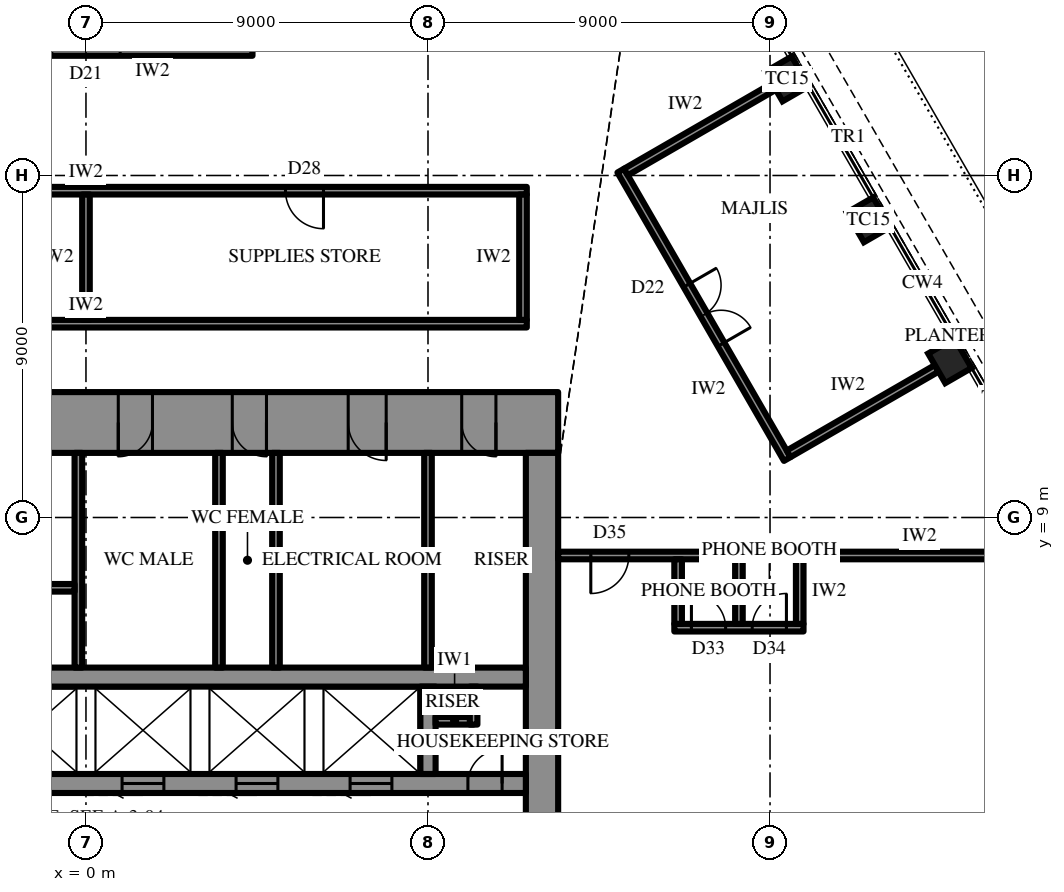
"""IFC4 building model, lengths in metres.
Left out: names, types, materials, properties, quantities, classifications, styles, units other than length and angle.
Written with IfcOpenShell. Run it as: python <this file> out.ifc"""

import sys

from ifc_helpers import new_model, si_unit, direction, frame, frame_2d, origin, origin_2d, place, context, subcontext, project, spatial, rectangle, extrude, element, fill, save


model = new_model("IFC4")
c1 = context("Model", 3, precision=1e-05, world=origin(), true_north=direction((0.0, 1.0)))
c2 = subcontext(c1, "Body", "Model", "MODEL_VIEW")
j1 = project(units=[si_unit("LENGTHUNIT", "METRE"), si_unit("PLANEANGLEUNIT", "RADIAN")], contexts=[c1])
p1 = place(None, origin())
s1 = spatial("IfcSite", under=j1, at=p1, CompositionType="ELEMENT")
p2 = place(p1, origin())
s2 = spatial("IfcBuilding", under=s1, at=p2, CompositionType="ELEMENT")
p3 = place(p2, frame((0.0, 0.0, 361.9)))
s3 = spatial("IfcBuildingStorey", under=s2, at=p3, CompositionType="ELEMENT", Elevation=361.9)
for number, where, z_axis, x_axis in (
    (1, (22.733, 13.125, 0.0), (0.0, 0.0, 1.0), (-0.5, 0.866, 0.0)),
    (2, (20.592, 16.833, 0.0), (0.0, 0.0, 1.0), (-0.5, 0.866, 0.0)),
    (3, (18.451, 20.542, 0.0), (0.0, 0.0, 1.0), (-0.5, 0.866, 0.0)),
):
    element("IfcColumn", number, at=place(p3, frame(where, z_axis=z_axis, x_axis=x_axis)), inside=s3, PredefinedType="COLUMN", context=c2, shape_type="SweptSolid", body=[
        extrude(rectangle(XDim=0.9, YDim=0.8, at=origin_2d()), origin(), (0.0, 0.0, 1.0), 4.2),
    ])
p4 = place(p3, frame((-12.425, 11.5, 0.0), z_axis=(0.0, 0.0, 1.0), x_axis=(1.0, 0.0, 0.0)))
e4 = element("IfcWall", 4, at=p4, inside=s3, PredefinedType="SHEAR", context=c2, shape_type="SweptSolid", body=[
    extrude(rectangle(XDim=24.85, YDim=1.6, at=frame_2d((12.425, 0.0))), origin(), (0.0, 0.0, 1.0), 4.2),
])
p5 = place(p4, frame((13.275, 0.0, 0.0)))
e5 = element("IfcOpeningElement", 5, at=p5, cuts=e4, PredefinedType="OPENING", context=c2, shape_type="SweptSolid", body=[
    extrude(rectangle(XDim=0.9, YDim=2.2, at=frame_2d((0.45, 1.1))), frame((0.0, 0.81, 0.0), z_axis=(0.0, -1.0, 0.0), x_axis=(1.0, 0.0, 0.0)), (0.0, 0.0, 1.0), 1.62),
])
p6 = place(p4, frame((16.275, 0.0, 0.0)))
e6 = element("IfcOpeningElement", 6, at=p6, cuts=e4, PredefinedType="OPENING", context=c2, shape_type="SweptSolid", body=[
    extrude(rectangle(XDim=0.9, YDim=2.2, at=frame_2d((0.45, 1.1))), frame((0.0, 0.81, 0.0), z_axis=(0.0, -1.0, 0.0), x_axis=(1.0, 0.0, 0.0)), (0.0, 0.0, 1.0), 1.62),
])
p7 = place(p4, frame((19.325, 0.0, 0.0)))
e7 = element("IfcOpeningElement", 7, at=p7, cuts=e4, PredefinedType="OPENING", context=c2, shape_type="SweptSolid", body=[
    extrude(rectangle(XDim=1.0, YDim=2.2, at=frame_2d((0.5, 1.1))), frame((0.0, 0.81, 0.0), z_axis=(0.0, -1.0, 0.0), x_axis=(1.0, 0.0, 0.0)), (0.0, 0.0, 1.0), 1.62),
])
p8 = place(p4, frame((1.637, 0.0, 0.0)))
e8 = element("IfcOpeningElement", 8, at=p8, cuts=e4, PredefinedType="OPENING", context=c2, shape_type="SweptSolid", body=[
    extrude(rectangle(XDim=0.9, YDim=2.2, at=frame_2d((0.45, 1.1))), frame((0.0, 0.81, 0.0), z_axis=(0.0, -1.0, 0.0), x_axis=(1.0, 0.0, 0.0)), (0.0, 0.0, 1.0), 1.62),
])
p9 = place(p4, frame((22.312, 0.0, 0.0)))
e9 = element("IfcOpeningElement", 9, at=p9, cuts=e4, PredefinedType="OPENING", context=c2, shape_type="SweptSolid", body=[
    extrude(rectangle(XDim=0.9, YDim=2.2, at=frame_2d((0.45, 1.1))), frame((0.0, 0.81, 0.0), z_axis=(0.0, -1.0, 0.0), x_axis=(1.0, 0.0, 0.0)), (0.0, 0.0, 1.0), 1.62),
])
p10 = place(p3, frame((12.0, -10.7, 0.0), z_axis=(0.0, 0.0, 1.0), x_axis=(0.0, 1.0, 0.0)))
e10 = element("IfcWall", 10, at=p10, inside=s3, PredefinedType="SHEAR", context=c2, shape_type="SweptSolid", body=[
    extrude(rectangle(XDim=21.4, YDim=0.85, at=frame_2d((10.7, 0.0))), origin(), (0.0, 0.0, 1.0), 4.2),
])
p11 = place(p10, frame((9.8, 0.0, 0.0)))
e11 = element("IfcOpeningElement", 11, at=p11, cuts=e10, PredefinedType="OPENING", context=c2, shape_type="SweptSolid", body=[
    extrude(rectangle(XDim=1.8, YDim=2.4, at=frame_2d((0.9, 1.2))), frame((0.0, 0.435, 0.0), z_axis=(0.0, -1.0, 0.0), x_axis=(1.0, 0.0, 0.0)), (0.0, 0.0, 1.0), 0.87),
])
p12 = place(p3, frame((-3.2, 2.0, 0.0), z_axis=(0.0, 0.0, 1.0), x_axis=(1.0, 0.0, 0.0)))
e12 = element("IfcWall", 12, at=p12, inside=s3, PredefinedType="SHEAR", context=c2, shape_type="SweptSolid", body=[
    extrude(rectangle(XDim=14.775, YDim=0.5, at=frame_2d((7.387, 0.0))), origin(), (0.0, 0.0, 1.0), 4.2),
])
p13 = place(p12, frame((13.25, 0.0, 0.0)))
e13 = element("IfcOpeningElement", 13, at=p13, cuts=e12, PredefinedType="OPENING", context=c2, shape_type="SweptSolid", body=[
    extrude(rectangle(XDim=0.9, YDim=2.2, at=frame_2d((0.45, 1.1))), frame((0.0, 0.26, 0.0), z_axis=(0.0, -1.0, 0.0), x_axis=(1.0, 0.0, 0.0)), (0.0, 0.0, 1.0), 0.52),
])
p14 = place(p12, frame((1.15, 0.0, 0.0)))
e14 = element("IfcOpeningElement", 14, at=p14, cuts=e12, PredefinedType="OPENING", context=c2, shape_type="SweptSolid", body=[
    extrude(rectangle(XDim=1.1, YDim=2.2, at=frame_2d((0.55, 1.1))), frame((0.0, 0.26, 0.0), z_axis=(0.0, -1.0, 0.0), x_axis=(1.0, 0.0, 0.0)), (0.0, 0.0, 1.0), 0.52),
])
p15 = place(p12, frame((4.15, 0.0, 0.0)))
e15 = element("IfcOpeningElement", 15, at=p15, cuts=e12, PredefinedType="OPENING", context=c2, shape_type="SweptSolid", body=[
    extrude(rectangle(XDim=1.1, YDim=2.2, at=frame_2d((0.55, 1.1))), frame((0.0, 0.26, 0.0), z_axis=(0.0, -1.0, 0.0), x_axis=(1.0, 0.0, 0.0)), (0.0, 0.0, 1.0), 0.52),
])
p16 = place(p12, frame((7.15, 0.0, 0.0)))
e16 = element("IfcOpeningElement", 16, at=p16, cuts=e12, PredefinedType="OPENING", context=c2, shape_type="SweptSolid", body=[
    extrude(rectangle(XDim=1.1, YDim=2.2, at=frame_2d((0.55, 1.1))), frame((0.0, 0.26, 0.0), z_axis=(0.0, -1.0, 0.0), x_axis=(1.0, 0.0, 0.0)), (0.0, 0.0, 1.0), 0.52),
])
p17 = place(p12, frame((10.15, 0.0, 0.0)))
e17 = element("IfcOpeningElement", 17, at=p17, cuts=e12, PredefinedType="OPENING", context=c2, shape_type="SweptSolid", body=[
    extrude(rectangle(XDim=1.1, YDim=2.2, at=frame_2d((0.55, 1.1))), frame((0.0, 0.26, 0.0), z_axis=(0.0, -1.0, 0.0), x_axis=(1.0, 0.0, 0.0)), (0.0, 0.0, 1.0), 0.52),
])
p18 = place(p3, frame((-11.575, 4.8, 0.0), z_axis=(0.0, 0.0, 1.0), x_axis=(1.0, 0.0, 0.0)))
e18 = element("IfcWall", 18, at=p18, inside=s3, PredefinedType="SHEAR", context=c2, shape_type="SweptSolid", body=[
    extrude(rectangle(XDim=23.15, YDim=0.5, at=frame_2d((11.575, 0.0))), origin(), (0.0, 0.0, 1.0), 4.2),
])
p19 = place(p18, frame((6.475, 0.0, 0.0)))
e19 = element("IfcOpeningElement", 19, at=p19, cuts=e18, PredefinedType="OPENING", context=c2, shape_type="SweptSolid", body=[
    extrude(rectangle(XDim=1.2, YDim=2.2, at=frame_2d((0.6, 1.1))), frame((0.0, 0.26, 0.0), z_axis=(0.0, -1.0, 0.0), x_axis=(1.0, 0.0, 0.0)), (0.0, 0.0, 1.0), 0.52),
])
p20 = place(p18, frame((3.475, 0.0, 0.0)))
e20 = element("IfcOpeningElement", 20, at=p20, cuts=e18, PredefinedType="OPENING", context=c2, shape_type="SweptSolid", body=[
    extrude(rectangle(XDim=1.2, YDim=2.2, at=frame_2d((0.6, 1.1))), frame((0.0, 0.26, 0.0), z_axis=(0.0, -1.0, 0.0), x_axis=(1.0, 0.0, 0.0)), (0.0, 0.0, 1.0), 0.52),
])
p21 = place(p3, frame((9.0, 2.25, 0.0), z_axis=(0.0, 0.0, 1.0), x_axis=(0.0, 1.0, 0.0)))
e21 = element("IfcWall", 21, at=p21, inside=s3, PredefinedType="SHEAR", context=c2, shape_type="SweptSolid", body=[
    extrude(rectangle(XDim=2.3, YDim=0.4, at=frame_2d((1.15, 0.0))), origin(), (0.0, 0.0, 1.0), 4.2),
])
p22 = place(p3, frame((-0.2, 5.05, 0.0), z_axis=(0.0, 0.0, 1.0), x_axis=(0.0, 1.0, 0.0)))
e22 = element("IfcWall", 22, at=p22, inside=s3, PredefinedType="SHEAR", context=c2, shape_type="SweptSolid", body=[
    extrude(rectangle(XDim=5.65, YDim=0.2, at=frame_2d((2.825, 0.0))), origin(), (0.0, 0.0, 1.0), 4.2),
])
p23 = place(p3, frame((-8.9, 7.15, 0.0), z_axis=(0.0, 0.0, 1.0), x_axis=(1.0, 0.0, 0.0)))
e23 = element("IfcWall", 23, at=p23, inside=s3, PredefinedType="SHEAR", context=c2, shape_type="SweptSolid", body=[
    extrude(rectangle(XDim=8.6, YDim=0.2, at=frame_2d((4.3, 0.0))), origin(), (0.0, 0.0, 1.0), 4.2),
])
p24 = place(p23, frame((0.3, 0.0, 0.0)))
e24 = element("IfcOpeningElement", 24, at=p24, cuts=e23, PredefinedType="OPENING", context=c2, shape_type="SweptSolid", body=[
    extrude(rectangle(XDim=1.0, YDim=2.2, at=frame_2d((0.5, 1.1))), frame((0.0, 0.11, 0.0), z_axis=(0.0, -1.0, 0.0), x_axis=(1.0, 0.0, 0.0)), (0.0, 0.0, 1.0), 0.22),
])
for number, where, z_axis, x_axis in (
    (25, (9.0, 5.05, 0.0), (0.0, 0.0, 1.0), (0.0, 1.0, 0.0)),
    (26, (3.5, 5.05, 0.0), (0.0, 0.0, 1.0), (0.0, 1.0, 0.0)),
    (27, (5.0, 5.05, 0.0), (0.0, 0.0, 1.0), (0.0, 1.0, 0.0)),
):
    element("IfcWall", number, at=place(p3, frame(where, z_axis=z_axis, x_axis=x_axis)), inside=s3, PredefinedType="PARTITIONING", context=c2, shape_type="SweptSolid", body=[
        extrude(rectangle(XDim=5.65, YDim=0.2, at=frame_2d((2.825, 0.0))), origin(), (0.0, 0.0, 1.0), 4.0),
    ])
for number, where, z_axis, x_axis in (
    (28, (9.2, 3.65, 0.0), (0.0, 0.0, 1.0), (1.0, 0.0, 0.0)),
    (29, (10.2, 3.55, 0.0), (0.0, 0.0, 1.0), (0.0, 1.0, 0.0)),
):
    element("IfcWall", number, at=place(p3, frame(where, z_axis=z_axis, x_axis=x_axis)), inside=s3, PredefinedType="PARTITIONING", context=c2, shape_type="SweptSolid", body=[
        extrude(rectangle(XDim=1.0, YDim=0.2, at=frame_2d((0.5, 0.0))), origin(), (0.0, 0.0, 1.0), 4.0),
    ])
p25 = place(p3, frame((-11.6, 14.1, 0.0), z_axis=(0.0, 0.0, 1.0), x_axis=(1.0, 0.0, 0.0)))
e30 = element("IfcWall", 30, at=p25, inside=s3, PredefinedType="PARTITIONING", context=c2, shape_type="SweptSolid", body=[
    extrude(rectangle(XDim=23.2, YDim=0.2, at=frame_2d((11.6, 0.0))), origin(), (0.0, 0.0, 1.0), 4.0),
])
p26 = place(p3, frame((-11.6, 17.6, 0.0), z_axis=(0.0, 0.0, 1.0), x_axis=(1.0, 0.0, 0.0)))
e31 = element("IfcWall", 31, at=p26, inside=s3, PredefinedType="PARTITIONING", context=c2, shape_type="SweptSolid", body=[
    extrude(rectangle(XDim=23.2, YDim=0.2, at=frame_2d((11.6, 0.0))), origin(), (0.0, 0.0, 1.0), 4.0),
])
p27 = place(p26, frame((5.35, 0.0, 0.0)))
e32 = element("IfcOpeningElement", 32, at=p27, cuts=e31, PredefinedType="OPENING", context=c2, shape_type="SweptSolid", body=[
    extrude(rectangle(XDim=1.0, YDim=2.2, at=frame_2d((0.5, 1.1))), frame((0.0, 0.11, 0.0), z_axis=(0.0, -1.0, 0.0), x_axis=(1.0, 0.0, 0.0)), (0.0, 0.0, 1.0), 0.22),
])
p28 = place(p26, frame((16.85, 0.0, 0.0)))
e33 = element("IfcOpeningElement", 33, at=p28, cuts=e31, PredefinedType="OPENING", context=c2, shape_type="SweptSolid", body=[
    extrude(rectangle(XDim=1.0, YDim=2.2, at=frame_2d((0.5, 1.1))), frame((0.0, 0.11, 0.0), z_axis=(0.0, -1.0, 0.0), x_axis=(1.0, 0.0, 0.0)), (0.0, 0.0, 1.0), 0.22),
])
p29 = place(p3, frame((0.0, 14.2, 0.0), z_axis=(0.0, 0.0, 1.0), x_axis=(0.0, 1.0, 0.0)))
e34 = element("IfcWall", 34, at=p29, inside=s3, PredefinedType="PARTITIONING", context=c2, shape_type="SweptSolid", body=[
    extrude(rectangle(XDim=3.3, YDim=0.2, at=frame_2d((1.65, 0.0))), origin(), (0.0, 0.0, 1.0), 2.992),
])
p30 = place(p3, frame((11.5, 14.2, 0.0), z_axis=(0.0, 0.0, 1.0), x_axis=(0.0, 1.0, 0.0)))
e35 = element("IfcWall", 35, at=p30, inside=s3, PredefinedType="PARTITIONING", context=c2, shape_type="SweptSolid", body=[
    extrude(rectangle(XDim=3.3, YDim=0.2, at=frame_2d((1.65, 0.0))), origin(), (0.0, 0.0, 1.0), 4.0),
])
p31 = place(p3, frame((4.382, 21.25, 0.0), z_axis=(0.0, 0.0, 1.0), x_axis=(-1.0, 0.0, 0.0)))
e36 = element("IfcWall", 36, at=p31, inside=s3, PredefinedType="PARTITIONING", context=c2, shape_type="SweptSolid", body=[
    extrude(rectangle(XDim=8.764, YDim=0.2, at=frame_2d((4.382, 0.0))), origin(), (0.0, 0.0, 1.0), 4.0),
])
p32 = place(p31, frame((3.482, 0.0, 0.0)))
e37 = element("IfcOpeningElement", 37, at=p32, cuts=e36, PredefinedType="OPENING", context=c2, shape_type="SweptSolid", body=[
    extrude(rectangle(XDim=1.8, YDim=2.4, at=frame_2d((0.9, 1.2))), frame((0.0, 0.11, 0.0), z_axis=(0.0, -1.0, 0.0), x_axis=(1.0, 0.0, 0.0)), (0.0, 0.0, 1.0), 0.22),
])
p33 = place(p3, frame((18.453, 10.538, 0.0), z_axis=(0.0, 0.0, 1.0), x_axis=(-0.500006995557, 0.86602136486, 0.0)))
e38 = element("IfcWall", 38, at=p33, inside=s3, PredefinedType="PARTITIONING", context=c2, shape_type="SweptSolid", body=[
    extrude(rectangle(XDim=8.764, YDim=0.2, at=frame_2d((4.382, 0.0))), origin(), (0.0, 0.0, 1.0), 4.0),
])
p34 = place(p33, frame((3.482, 0.0, 0.0)))
e39 = element("IfcOpeningElement", 39, at=p34, cuts=e38, PredefinedType="OPENING", context=c2, shape_type="SweptSolid", body=[
    extrude(rectangle(XDim=1.8, YDim=2.4, at=frame_2d((0.9, 1.2))), frame((0.0, 0.11, 0.0), z_axis=(0.0, -1.0, 0.0), x_axis=(1.0, 0.0, 0.0)), (0.0, 0.0, 1.0), 0.22),
])
p35 = place(p3, frame((18.49, 10.675, 0.0), z_axis=(0.0, 0.0, 1.0), x_axis=(0.866017533419, 0.500013631625, 0.0)))
e40 = element("IfcWall", 40, at=p35, inside=s3, PredefinedType="PARTITIONING", context=c2, shape_type="SweptSolid", body=[
    extrude(rectangle(XDim=4.5, YDim=0.2, at=frame_2d((2.25, 0.0))), origin(), (0.0, 0.0, 1.0), 3.082),
])
p36 = place(p3, frame((14.208, 18.092, 0.0), z_axis=(0.0, 0.0, 1.0), x_axis=(0.866031096941, 0.499990139034, 0.0)))
e41 = element("IfcWall", 41, at=p36, inside=s3, PredefinedType="PARTITIONING", context=c2, shape_type="SweptSolid", body=[
    extrude(rectangle(XDim=4.5, YDim=0.2, at=frame_2d((2.25, 0.0))), origin(), (0.0, 0.0, 1.0), 3.082),
])
p37 = place(p3, frame((12.425, 8.0, 0.0), z_axis=(0.0, 0.0, 1.0), x_axis=(1.0, 0.0, 0.0)))
e42 = element("IfcWall", 42, at=p37, inside=s3, PredefinedType="PARTITIONING", context=c2, shape_type="SweptSolid", body=[
    extrude(rectangle(XDim=13.59, YDim=0.2, at=frame_2d((6.795, 0.0))), origin(), (0.0, 0.0, 1.0), 4.0),
])
p38 = place(p37, frame((0.859, 0.0, 0.0)))
e43 = element("IfcOpeningElement", 43, at=p38, cuts=e42, PredefinedType="OPENING", context=c2, shape_type="SweptSolid", body=[
    extrude(rectangle(XDim=1.0, YDim=2.2, at=frame_2d((0.5, 1.1))), frame((0.0, 0.11, 0.0), z_axis=(0.0, -1.0, 0.0), x_axis=(1.0, 0.0, 0.0)), (0.0, 0.0, 1.0), 0.22),
])
p39 = place(p3, frame((15.482, 6.1, 0.0), z_axis=(0.0, 0.0, 1.0), x_axis=(1.0, 0.0, 0.0)))
e44 = element("IfcWall", 44, at=p39, inside=s3, PredefinedType="PARTITIONING", context=c2, shape_type="SweptSolid", body=[
    extrude(rectangle(XDim=3.4, YDim=0.2, at=frame_2d((1.7, 0.0))), origin(), (0.0, 0.0, 1.0), 4.0),
])
p40 = place(p39, frame((0.45, 0.0, 0.0)))
e45 = element("IfcOpeningElement", 45, at=p40, cuts=e44, PredefinedType="OPENING", context=c2, shape_type="SweptSolid", body=[
    extrude(rectangle(XDim=0.9, YDim=2.2, at=frame_2d((0.45, 1.1))), frame((0.0, 0.11, 0.0), z_axis=(0.0, -1.0, 0.0), x_axis=(1.0, 0.0, 0.0)), (0.0, 0.0, 1.0), 0.22),
])
p41 = place(p39, frame((2.05, 0.0, 0.0)))
e46 = element("IfcOpeningElement", 46, at=p41, cuts=e44, PredefinedType="OPENING", context=c2, shape_type="SweptSolid", body=[
    extrude(rectangle(XDim=0.9, YDim=2.2, at=frame_2d((0.45, 1.1))), frame((0.0, 0.11, 0.0), z_axis=(0.0, -1.0, 0.0), x_axis=(1.0, 0.0, 0.0)), (0.0, 0.0, 1.0), 0.22),
])
for number, where, z_axis, x_axis in (
    (47, (15.582, 7.9, 0.0), (0.0, 0.0, 1.0), (0.0, -1.0, 0.0)),
    (48, (17.182, 7.9, 0.0), (0.0, 0.0, 1.0), (0.0, -1.0, 0.0)),
    (49, (18.781, 7.9, 0.0), (0.0, 0.0, 1.0), (0.0, -1.0, 0.0)),
):
    element("IfcWall", number, at=place(p3, frame(where, z_axis=z_axis, x_axis=x_axis)), inside=s3, PredefinedType="PARTITIONING", context=c2, shape_type="SweptSolid", body=[
        extrude(rectangle(XDim=1.7, YDim=0.2, at=frame_2d((0.85, 0.0))), origin(), (0.0, 0.0, 1.0), 4.0),
    ])
p42 = place(p5, frame((0.9, 0.0, 0.0), z_axis=(0.0, 0.0, 1.0), x_axis=(-1.0, 0.0, 0.0)))
e50 = element("IfcDoor", 50, at=p42, inside=s3, OperationType="SINGLE_SWING_LEFT", PredefinedType="DOOR", context=c2, shape_type="SweptSolid", body=[
    extrude(rectangle(XDim=0.9, YDim=2.2, at=frame_2d((0.45, 1.1))), frame((0.0, 0.025, 0.0), z_axis=(0.0, -1.0, 0.0), x_axis=(1.0, 0.0, 0.0)), (0.0, 0.0, 1.0), 0.05),
])
fill(e5, e50)
p43 = place(p6, frame((0.9, 0.0, 0.0), z_axis=(0.0, 0.0, 1.0), x_axis=(-1.0, 0.0, 0.0)))
e51 = element("IfcDoor", 51, at=p43, inside=s3, OperationType="SINGLE_SWING_RIGHT", PredefinedType="DOOR", context=c2, shape_type="SweptSolid", body=[
    extrude(rectangle(XDim=0.9, YDim=2.2, at=frame_2d((0.45, 1.1))), frame((0.0, 0.025, 0.0), z_axis=(0.0, -1.0, 0.0), x_axis=(1.0, 0.0, 0.0)), (0.0, 0.0, 1.0), 0.05),
])
fill(e6, e51)
p44 = place(p7, frame((1.0, 0.0, 0.0), z_axis=(0.0, 0.0, 1.0), x_axis=(-1.0, 0.0, 0.0)))
e52 = element("IfcDoor", 52, at=p44, inside=s3, OperationType="SINGLE_SWING_RIGHT", PredefinedType="DOOR", context=c2, shape_type="SweptSolid", body=[
    extrude(rectangle(XDim=1.0, YDim=2.2, at=frame_2d((0.5, 1.1))), frame((0.0, 0.025, 0.0), z_axis=(0.0, -1.0, 0.0), x_axis=(1.0, 0.0, 0.0)), (0.0, 0.0, 1.0), 0.05),
])
fill(e7, e52)
p45 = place(p9, frame((0.9, 0.0, 0.0), z_axis=(0.0, 0.0, 1.0), x_axis=(-1.0, 0.0, 0.0)))
e53 = element("IfcDoor", 53, at=p45, inside=s3, OperationType="SINGLE_SWING_RIGHT", PredefinedType="DOOR", context=c2, shape_type="SweptSolid", body=[
    extrude(rectangle(XDim=0.9, YDim=2.2, at=frame_2d((0.45, 1.1))), frame((0.0, 0.025, 0.0), z_axis=(0.0, -1.0, 0.0), x_axis=(1.0, 0.0, 0.0)), (0.0, 0.0, 1.0), 0.05),
])
fill(e9, e53)
p46 = place(p13, origin())
e54 = element("IfcDoor", 54, at=p46, inside=s3, OperationType="SINGLE_SWING_LEFT", PredefinedType="DOOR", context=c2, shape_type="SweptSolid", body=[
    extrude(rectangle(XDim=0.9, YDim=2.2, at=frame_2d((0.45, 1.1))), frame((0.0, 0.025, 0.0), z_axis=(0.0, -1.0, 0.0), x_axis=(1.0, 0.0, 0.0)), (0.0, 0.0, 1.0), 0.05),
])
fill(e13, e54)
p47 = place(p15, frame((1.1, 0.0, 0.0), z_axis=(0.0, 0.0, 1.0), x_axis=(-1.0, 0.0, 0.0)))
e55 = element("IfcDoor", 55, at=p47, inside=s3, OperationType="SLIDING_TO_LEFT", PredefinedType="DOOR", context=c2, shape_type="SweptSolid", body=[
    extrude(rectangle(XDim=1.1, YDim=2.2, at=frame_2d((0.55, 1.1))), frame((0.0, 0.025, 0.0), z_axis=(0.0, -1.0, 0.0), x_axis=(1.0, 0.0, 0.0)), (0.0, 0.0, 1.0), 0.05),
])
fill(e15, e55)
p48 = place(p16, frame((1.1, 0.0, 0.0), z_axis=(0.0, 0.0, 1.0), x_axis=(-1.0, 0.0, 0.0)))
e56 = element("IfcDoor", 56, at=p48, inside=s3, OperationType="SLIDING_TO_LEFT", PredefinedType="DOOR", context=c2, shape_type="SweptSolid", body=[
    extrude(rectangle(XDim=1.1, YDim=2.2, at=frame_2d((0.55, 1.1))), frame((0.0, 0.025, 0.0), z_axis=(0.0, -1.0, 0.0), x_axis=(1.0, 0.0, 0.0)), (0.0, 0.0, 1.0), 0.05),
])
fill(e16, e56)
p49 = place(p17, frame((1.1, 0.0, 0.0), z_axis=(0.0, 0.0, 1.0), x_axis=(-1.0, 0.0, 0.0)))
e57 = element("IfcDoor", 57, at=p49, inside=s3, OperationType="SLIDING_TO_LEFT", PredefinedType="DOOR", context=c2, shape_type="SweptSolid", body=[
    extrude(rectangle(XDim=1.1, YDim=2.2, at=frame_2d((0.55, 1.1))), frame((0.0, 0.025, 0.0), z_axis=(0.0, -1.0, 0.0), x_axis=(1.0, 0.0, 0.0)), (0.0, 0.0, 1.0), 0.05),
])
fill(e17, e57)
p50 = place(p28, frame((1.0, 0.0, 0.0), z_axis=(0.0, 0.0, 1.0), x_axis=(-1.0, 0.0, 0.0)))
e58 = element("IfcDoor", 58, at=p50, inside=s3, OperationType="SINGLE_SWING_RIGHT", PredefinedType="DOOR", context=c2, shape_type="SweptSolid", body=[
    extrude(rectangle(XDim=1.0, YDim=2.2, at=frame_2d((0.5, 1.1))), frame((0.0, 0.025, 0.0), z_axis=(0.0, -1.0, 0.0), x_axis=(1.0, 0.0, 0.0)), (0.0, 0.0, 1.0), 0.05),
])
fill(e33, e58)
p51 = place(p32, frame((1.8, 0.0, 0.0), z_axis=(0.0, 0.0, 1.0), x_axis=(-1.0, 0.0, 0.0)))
e59 = element("IfcDoor", 59, at=p51, inside=s3, OperationType="DOUBLE_DOOR_SINGLE_SWING", PredefinedType="DOOR", context=c2, shape_type="SweptSolid", body=[
    extrude(rectangle(XDim=1.8, YDim=2.4, at=frame_2d((0.9, 1.2))), frame((0.0, 0.025, 0.0), z_axis=(0.0, -1.0, 0.0), x_axis=(1.0, 0.0, 0.0)), (0.0, 0.0, 1.0), 0.05),
])
fill(e37, e59)
p52 = place(p34, frame((1.8, 0.0, 0.0), z_axis=(0.0, 0.0, 1.0), x_axis=(-1.0, 0.0, 0.0)))
e60 = element("IfcDoor", 60, at=p52, inside=s3, OperationType="DOUBLE_DOOR_SINGLE_SWING", PredefinedType="DOOR", context=c2, shape_type="SweptSolid", body=[
    extrude(rectangle(XDim=1.8, YDim=2.4, at=frame_2d((0.9, 1.2))), frame((0.0, 0.025, 0.0), z_axis=(0.0, -1.0, 0.0), x_axis=(1.0, 0.0, 0.0)), (0.0, 0.0, 1.0), 0.05),
])
fill(e39, e60)
p53 = place(p38, frame((1.0, 0.0, 0.0), z_axis=(0.0, 0.0, 1.0), x_axis=(-1.0, 0.0, 0.0)))
e61 = element("IfcDoor", 61, at=p53, inside=s3, OperationType="SINGLE_SWING_LEFT", PredefinedType="DOOR", context=c2, shape_type="SweptSolid", body=[
    extrude(rectangle(XDim=1.0, YDim=2.2, at=frame_2d((0.5, 1.1))), frame((0.0, 0.025, 0.0), z_axis=(0.0, -1.0, 0.0), x_axis=(1.0, 0.0, 0.0)), (0.0, 0.0, 1.0), 0.05),
])
fill(e43, e61)
p54 = place(p40, origin())
e62 = element("IfcDoor", 62, at=p54, inside=s3, OperationType="SINGLE_SWING_RIGHT", PredefinedType="DOOR", context=c2, shape_type="SweptSolid", body=[
    extrude(rectangle(XDim=0.9, YDim=2.2, at=frame_2d((0.45, 1.1))), frame((0.0, 0.025, 0.0), z_axis=(0.0, -1.0, 0.0), x_axis=(1.0, 0.0, 0.0)), (0.0, 0.0, 1.0), 0.05),
])
fill(e45, e62)
p55 = place(p41, origin())
e63 = element("IfcDoor", 63, at=p55, inside=s3, OperationType="SINGLE_SWING_LEFT", PredefinedType="DOOR", context=c2, shape_type="SweptSolid", body=[
    extrude(rectangle(XDim=0.9, YDim=2.2, at=frame_2d((0.45, 1.1))), frame((0.0, 0.025, 0.0), z_axis=(0.0, -1.0, 0.0), x_axis=(1.0, 0.0, 0.0)), (0.0, 0.0, 1.0), 0.05),
])
fill(e46, e63)
save(model, sys.argv[1])
